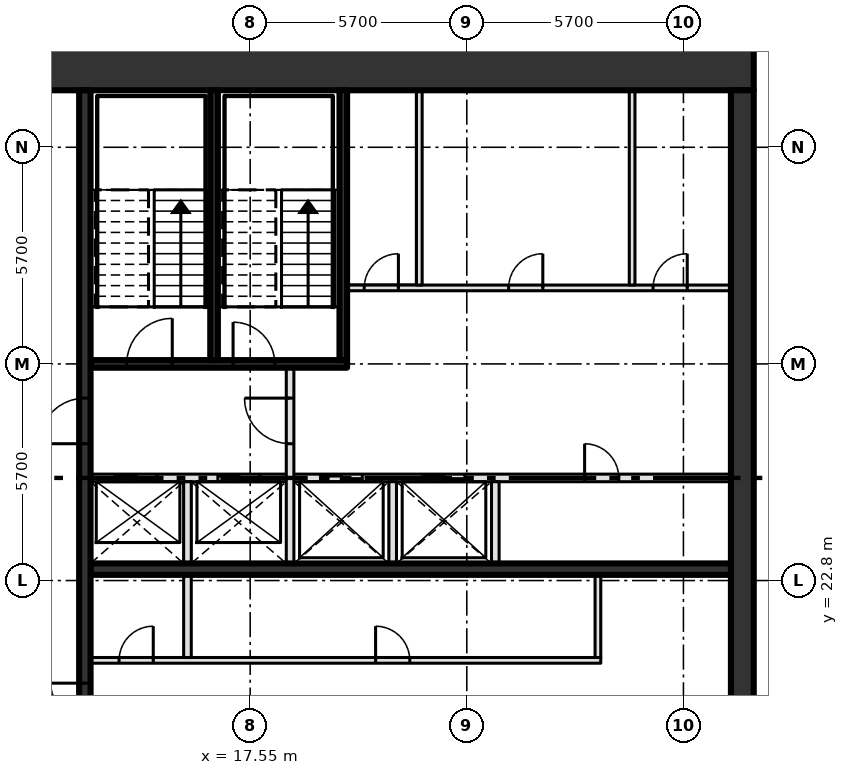
"""IFC4 building model, lengths in metres.
Left out: names, types, materials, properties, quantities, classifications, styles, units other than length and angle.
Written with IfcOpenShell. Run it as: python <this file> out.ifc"""

import sys

from ifc_helpers import new_model, si_unit, direction, frame, frame_2d, origin, place, context, subcontext, project, spatial, rectangle, extrude, element, fill, save


model = new_model("IFC4")
c1 = context("Model", 3, precision=1e-05, world=origin(), true_north=direction((0.0, 1.0)))
c2 = subcontext(c1, "Body", "Model", "MODEL_VIEW")
j1 = project(units=[si_unit("LENGTHUNIT", "METRE"), si_unit("PLANEANGLEUNIT", "RADIAN")], contexts=[c1])
p1 = place(None, origin())
s1 = spatial("IfcSite", under=j1, at=p1, CompositionType="ELEMENT")
p2 = place(p1, origin())
s2 = spatial("IfcBuilding", under=s1, at=p2, CompositionType="ELEMENT")
p3 = place(p2, frame((0.0, 0.0, 310.8)))
s3 = spatial("IfcBuildingStorey", under=s2, at=p3, CompositionType="ELEMENT", Elevation=310.8)
p4 = place(p3, frame((8.0, 36.3, -0.3), z_axis=(0.0, 0.0, 1.0), x_axis=(1.0, 0.0, 0.0)))
e1 = element("IfcWall", 1, at=p4, inside=s3, PredefinedType="SHEAR", context=c2, shape_type="SweptSolid", body=[
    extrude(rectangle(XDim=22.8, YDim=1.2, at=frame_2d((11.4, 0.0))), origin(), (0.0, 0.0, 1.0), 4.2),
])
p5 = place(p4, frame((2.3, 0.0, 0.3)))
e2 = element("IfcOpeningElement", 2, at=p5, cuts=e1, PredefinedType="OPENING", context=c2, shape_type="SweptSolid", body=[
    extrude(rectangle(XDim=1.8, YDim=2.1, at=frame_2d((0.9, 1.05))), frame((0.0, 0.61, 0.0), z_axis=(0.0, -1.0, 0.0), x_axis=(1.0, 0.0, 0.0)), (0.0, 0.0, 1.0), 1.22),
])
p6 = place(p3, frame((30.5, 14.7, -0.3), z_axis=(0.0, 0.0, 1.0), x_axis=(0.0, 1.0, 0.0)))
e3 = element("IfcWall", 3, at=p6, inside=s3, PredefinedType="SHEAR", context=c2, shape_type="SweptSolid", body=[
    extrude(rectangle(XDim=21.0, YDim=0.6, at=frame_2d((10.5, 0.0))), origin(), (0.0, 0.0, 1.0), 4.2),
])
p7 = place(p3, frame((13.35, 20.7, 0.0), z_axis=(0.0, 0.0, 1.0), x_axis=(1.0, 0.0, 0.0)))
e4 = element("IfcWall", 4, at=p7, inside=s3, PredefinedType="PARTITIONING", context=c2, shape_type="SweptSolid", body=[
    extrude(rectangle(XDim=13.425, YDim=0.15, at=frame_2d((6.712, 0.0))), origin(), (0.0, 0.0, 1.0), 3.9),
])
p8 = place(p7, frame((0.75, 0.0, 0.0)))
e5 = element("IfcOpeningElement", 5, at=p8, cuts=e4, PredefinedType="OPENING", context=c2, shape_type="SweptSolid", body=[
    extrude(rectangle(XDim=0.9, YDim=2.1, at=frame_2d((0.45, 1.05))), frame((0.0, 0.085, 0.0), z_axis=(0.0, -1.0, 0.0), x_axis=(1.0, 0.0, 0.0)), (0.0, 0.0, 1.0), 0.17),
])
p9 = place(p7, frame((7.5, 0.0, 0.0)))
e6 = element("IfcOpeningElement", 6, at=p9, cuts=e4, PredefinedType="OPENING", context=c2, shape_type="SweptSolid", body=[
    extrude(rectangle(XDim=0.9, YDim=2.1, at=frame_2d((0.45, 1.05))), frame((0.0, 0.085, 0.0), z_axis=(0.0, -1.0, 0.0), x_axis=(1.0, 0.0, 0.0)), (0.0, 0.0, 1.0), 0.17),
])
p10 = place(p3, frame((13.35, 23.1, 0.0), z_axis=(0.0, 0.0, 1.0), x_axis=(1.0, 0.0, 0.0)))
e7 = element("IfcWall", 7, at=p10, inside=s3, PredefinedType="SHEAR", context=c2, shape_type="SweptSolid", body=[
    extrude(rectangle(XDim=16.85, YDim=0.3, at=frame_2d((8.425, 0.0))), origin(), (0.0, 0.0, 1.0), 3.9),
])
p11 = place(p3, frame((13.35, 25.5, 0.0), z_axis=(0.0, 0.0, 1.0), x_axis=(1.0, 0.0, 0.0)))
e8 = element("IfcWall", 8, at=p11, inside=s3, PredefinedType="SOLIDWALL", context=c2, shape_type="SweptSolid", body=[
    extrude(rectangle(XDim=16.85, YDim=0.2, at=frame_2d((8.425, 0.0))), origin(), (0.0, 0.0, 1.0), 3.9),
])
p12 = place(p11, frame((0.65, 0.0, 0.0)))
e9 = element("IfcOpeningElement", 9, at=p12, cuts=e8, PredefinedType="OPENING", context=c2, shape_type="SweptSolid", body=[
    extrude(rectangle(XDim=1.1, YDim=2.1, at=frame_2d((0.55, 1.05))), frame((0.0, 0.11, 0.0), z_axis=(0.0, -1.0, 0.0), x_axis=(1.0, 0.0, 0.0)), (0.0, 0.0, 1.0), 0.22),
])
p13 = place(p11, frame((3.35, 0.0, 0.0)))
e10 = element("IfcOpeningElement", 10, at=p13, cuts=e8, PredefinedType="OPENING", context=c2, shape_type="SweptSolid", body=[
    extrude(rectangle(XDim=1.1, YDim=2.1, at=frame_2d((0.55, 1.05))), frame((0.0, 0.11, 0.0), z_axis=(0.0, -1.0, 0.0), x_axis=(1.0, 0.0, 0.0)), (0.0, 0.0, 1.0), 0.22),
])
p14 = place(p11, frame((6.05, 0.0, 0.0)))
e11 = element("IfcOpeningElement", 11, at=p14, cuts=e8, PredefinedType="OPENING", context=c2, shape_type="SweptSolid", body=[
    extrude(rectangle(XDim=1.1, YDim=2.1, at=frame_2d((0.55, 1.05))), frame((0.0, 0.11, 0.0), z_axis=(0.0, -1.0, 0.0), x_axis=(1.0, 0.0, 0.0)), (0.0, 0.0, 1.0), 0.22),
])
p15 = place(p11, frame((8.75, 0.0, 0.0)))
e12 = element("IfcOpeningElement", 12, at=p15, cuts=e8, PredefinedType="OPENING", context=c2, shape_type="SweptSolid", body=[
    extrude(rectangle(XDim=1.1, YDim=2.1, at=frame_2d((0.55, 1.05))), frame((0.0, 0.11, 0.0), z_axis=(0.0, -1.0, 0.0), x_axis=(1.0, 0.0, 0.0)), (0.0, 0.0, 1.0), 0.22),
])
p16 = place(p11, frame((13.0, 0.0, 0.0)))
e13 = element("IfcOpeningElement", 13, at=p16, cuts=e8, PredefinedType="OPENING", context=c2, shape_type="SweptSolid", body=[
    extrude(rectangle(XDim=0.9, YDim=2.1, at=frame_2d((0.45, 1.05))), frame((0.0, 0.11, 0.0), z_axis=(0.0, -1.0, 0.0), x_axis=(1.0, 0.0, 0.0)), (0.0, 0.0, 1.0), 0.22),
])
p17 = place(p3, frame((13.35, 28.5, 0.0), z_axis=(0.0, 0.0, 1.0), x_axis=(1.0, 0.0, 0.0)))
e14 = element("IfcWall", 14, at=p17, inside=s3, PredefinedType="SOLIDWALL", context=c2, shape_type="SweptSolid", body=[
    extrude(rectangle(XDim=6.75, YDim=0.2, at=frame_2d((3.375, 0.0))), origin(), (0.0, 0.0, 1.0), 3.9),
])
p18 = place(p17, frame((0.95, 0.0, 0.0)))
e15 = element("IfcOpeningElement", 15, at=p18, cuts=e14, PredefinedType="OPENING", context=c2, shape_type="SweptSolid", body=[
    extrude(rectangle(XDim=1.2, YDim=2.1, at=frame_2d((0.6, 1.05))), frame((0.0, 0.11, 0.0), z_axis=(0.0, -1.0, 0.0), x_axis=(1.0, 0.0, 0.0)), (0.0, 0.0, 1.0), 0.22),
])
p19 = place(p17, frame((3.75, 0.0, 0.0)))
e16 = element("IfcOpeningElement", 16, at=p19, cuts=e14, PredefinedType="OPENING", context=c2, shape_type="SweptSolid", body=[
    extrude(rectangle(XDim=1.1, YDim=2.1, at=frame_2d((0.55, 1.05))), frame((0.0, 0.11, 0.0), z_axis=(0.0, -1.0, 0.0), x_axis=(1.0, 0.0, 0.0)), (0.0, 0.0, 1.0), 0.22),
])
p20 = place(p3, frame((20.1, 30.5, 0.0), z_axis=(0.0, 0.0, 1.0), x_axis=(1.0, 0.0, 0.0)))
e17 = element("IfcWall", 17, at=p20, inside=s3, PredefinedType="PARTITIONING", context=c2, shape_type="SweptSolid", body=[
    extrude(rectangle(XDim=10.1, YDim=0.15, at=frame_2d((5.05, 0.0))), origin(), (0.0, 0.0, 1.0), 3.9),
])
p21 = place(p20, frame((0.45, 0.0, 0.0)))
e18 = element("IfcOpeningElement", 18, at=p21, cuts=e17, PredefinedType="OPENING", context=c2, shape_type="SweptSolid", body=[
    extrude(rectangle(XDim=0.9, YDim=2.1, at=frame_2d((0.45, 1.05))), frame((0.0, 0.085, 0.0), z_axis=(0.0, -1.0, 0.0), x_axis=(1.0, 0.0, 0.0)), (0.0, 0.0, 1.0), 0.17),
])
p22 = place(p20, frame((4.25, 0.0, 0.0)))
e19 = element("IfcOpeningElement", 19, at=p22, cuts=e17, PredefinedType="OPENING", context=c2, shape_type="SweptSolid", body=[
    extrude(rectangle(XDim=0.9, YDim=2.1, at=frame_2d((0.45, 1.05))), frame((0.0, 0.085, 0.0), z_axis=(0.0, -1.0, 0.0), x_axis=(1.0, 0.0, 0.0)), (0.0, 0.0, 1.0), 0.17),
])
p23 = place(p20, frame((8.05, 0.0, 0.0)))
e20 = element("IfcOpeningElement", 20, at=p23, cuts=e17, PredefinedType="OPENING", context=c2, shape_type="SweptSolid", body=[
    extrude(rectangle(XDim=0.9, YDim=2.1, at=frame_2d((0.45, 1.05))), frame((0.0, 0.085, 0.0), z_axis=(0.0, -1.0, 0.0), x_axis=(1.0, 0.0, 0.0)), (0.0, 0.0, 1.0), 0.17),
])
p24 = place(p3, frame((13.2, 14.7, 0.0), z_axis=(0.0, 0.0, 1.0), x_axis=(0.0, 1.0, 0.0)))
e21 = element("IfcWall", 21, at=p24, inside=s3, PredefinedType="SHEAR", context=c2, shape_type="SweptSolid", body=[
    extrude(rectangle(XDim=21.0, YDim=0.3, at=frame_2d((10.5, 0.0))), origin(), (0.0, 0.0, 1.0), 3.9),
])
p25 = place(p24, frame((3.6, 0.0, 0.0)))
e22 = element("IfcOpeningElement", 22, at=p25, cuts=e21, PredefinedType="OPENING", context=c2, shape_type="SweptSolid", body=[
    extrude(rectangle(XDim=1.8, YDim=2.1, at=frame_2d((0.9, 1.05))), frame((0.0, 0.16, 0.0), z_axis=(0.0, -1.0, 0.0), x_axis=(1.0, 0.0, 0.0)), (0.0, 0.0, 1.0), 0.32),
])
p26 = place(p24, frame((11.7, 0.0, 0.0)))
e23 = element("IfcOpeningElement", 23, at=p26, cuts=e21, PredefinedType="OPENING", context=c2, shape_type="SweptSolid", body=[
    extrude(rectangle(XDim=1.2, YDim=2.1, at=frame_2d((0.6, 1.05))), frame((0.0, 0.16, 0.0), z_axis=(0.0, -1.0, 0.0), x_axis=(1.0, 0.0, 0.0)), (0.0, 0.0, 1.0), 0.32),
])
p27 = place(p3, frame((15.9, 20.775, 0.0), z_axis=(0.0, 0.0, 1.0), x_axis=(0.0, 1.0, 0.0)))
e24 = element("IfcWall", 24, at=p27, inside=s3, PredefinedType="SOLIDWALL", context=c2, shape_type="SweptSolid", body=[
    extrude(rectangle(XDim=4.625, YDim=0.2, at=frame_2d((2.312, 0.0))), origin(), (0.0, 0.0, 1.0), 3.9),
])
p28 = place(p3, frame((16.6, 28.6, 0.0), z_axis=(0.0, 0.0, 1.0), x_axis=(0.0, 1.0, 0.0)))
e25 = element("IfcWall", 25, at=p28, inside=s3, PredefinedType="SOLIDWALL", context=c2, shape_type="SweptSolid", body=[
    extrude(rectangle(XDim=7.1, YDim=0.2, at=frame_2d((3.55, 0.0))), origin(), (0.0, 0.0, 1.0), 3.9),
])
p29 = place(p3, frame((18.6, 23.25, 0.0), z_axis=(0.0, 0.0, 1.0), x_axis=(0.0, 1.0, 0.0)))
e26 = element("IfcWall", 26, at=p29, inside=s3, PredefinedType="SOLIDWALL", context=c2, shape_type="SweptSolid", body=[
    extrude(rectangle(XDim=5.15, YDim=0.2, at=frame_2d((2.575, 0.0))), origin(), (0.0, 0.0, 1.0), 3.9),
])
p30 = place(p29, frame((3.15, 0.0, 0.0)))
e27 = element("IfcOpeningElement", 27, at=p30, cuts=e26, PredefinedType="OPENING", context=c2, shape_type="SweptSolid", body=[
    extrude(rectangle(XDim=1.2, YDim=2.1, at=frame_2d((0.6, 1.05))), frame((0.0, 0.11, 0.0), z_axis=(0.0, -1.0, 0.0), x_axis=(1.0, 0.0, 0.0)), (0.0, 0.0, 1.0), 0.22),
])
p31 = place(p3, frame((20.0, 28.6, 0.0), z_axis=(0.0, 0.0, 1.0), x_axis=(0.0, 1.0, 0.0)))
e28 = element("IfcWall", 28, at=p31, inside=s3, PredefinedType="SOLIDWALL", context=c2, shape_type="SweptSolid", body=[
    extrude(rectangle(XDim=7.1, YDim=0.2, at=frame_2d((3.55, 0.0))), origin(), (0.0, 0.0, 1.0), 3.9),
])
p32 = place(p3, frame((21.3, 23.25, 0.0), z_axis=(0.0, 0.0, 1.0), x_axis=(0.0, 1.0, 0.0)))
e29 = element("IfcWall", 29, at=p32, inside=s3, PredefinedType="SOLIDWALL", context=c2, shape_type="SweptSolid", body=[
    extrude(rectangle(XDim=2.15, YDim=0.2, at=frame_2d((1.075, 0.0))), origin(), (0.0, 0.0, 1.0), 3.9),
])
p33 = place(p3, frame((22.0, 30.575, 0.0), z_axis=(0.0, 0.0, 1.0), x_axis=(0.0, 1.0, 0.0)))
e30 = element("IfcWall", 30, at=p33, inside=s3, PredefinedType="PARTITIONING", context=c2, shape_type="SweptSolid", body=[
    extrude(rectangle(XDim=5.125, YDim=0.15, at=frame_2d((2.562, 0.0))), origin(), (0.0, 0.0, 1.0), 3.9),
])
p34 = place(p3, frame((24.0, 23.25, 0.0), z_axis=(0.0, 0.0, 1.0), x_axis=(0.0, 1.0, 0.0)))
e31 = element("IfcWall", 31, at=p34, inside=s3, PredefinedType="SOLIDWALL", context=c2, shape_type="SweptSolid", body=[
    extrude(rectangle(XDim=2.15, YDim=0.2, at=frame_2d((1.075, 0.0))), origin(), (0.0, 0.0, 1.0), 3.9),
])
p35 = place(p3, frame((26.7, 20.775, 0.0), z_axis=(0.0, 0.0, 1.0), x_axis=(0.0, 1.0, 0.0)))
e32 = element("IfcWall", 32, at=p35, inside=s3, PredefinedType="PARTITIONING", context=c2, shape_type="SweptSolid", body=[
    extrude(rectangle(XDim=2.175, YDim=0.15, at=frame_2d((1.087, 0.0))), origin(), (0.0, 0.0, 1.0), 3.9),
])
p36 = place(p3, frame((27.6, 30.575, 0.0), z_axis=(0.0, 0.0, 1.0), x_axis=(0.0, 1.0, 0.0)))
e33 = element("IfcWall", 33, at=p36, inside=s3, PredefinedType="PARTITIONING", context=c2, shape_type="SweptSolid", body=[
    extrude(rectangle(XDim=5.125, YDim=0.15, at=frame_2d((2.562, 0.0))), origin(), (0.0, 0.0, 1.0), 3.9),
])
p37 = place(p12, origin())
e34 = element("IfcDoor", 34, at=p37, inside=s3, OperationType="SLIDING_TO_LEFT", PredefinedType="DOOR", context=c2, shape_type="SweptSolid", body=[
    extrude(rectangle(XDim=1.1, YDim=2.1, at=frame_2d((0.55, 1.05))), frame((0.0, 0.025, 0.0), z_axis=(0.0, -1.0, 0.0), x_axis=(1.0, 0.0, 0.0)), (0.0, 0.0, 1.0), 0.05),
])
fill(e9, e34)
p38 = place(p13, origin())
e35 = element("IfcDoor", 35, at=p38, inside=s3, OperationType="SLIDING_TO_LEFT", PredefinedType="DOOR", context=c2, shape_type="SweptSolid", body=[
    extrude(rectangle(XDim=1.1, YDim=2.1, at=frame_2d((0.55, 1.05))), frame((0.0, 0.025, 0.0), z_axis=(0.0, -1.0, 0.0), x_axis=(1.0, 0.0, 0.0)), (0.0, 0.0, 1.0), 0.05),
])
fill(e10, e35)
p39 = place(p14, origin())
e36 = element("IfcDoor", 36, at=p39, inside=s3, OperationType="SLIDING_TO_LEFT", PredefinedType="DOOR", context=c2, shape_type="SweptSolid", body=[
    extrude(rectangle(XDim=1.1, YDim=2.1, at=frame_2d((0.55, 1.05))), frame((0.0, 0.025, 0.0), z_axis=(0.0, -1.0, 0.0), x_axis=(1.0, 0.0, 0.0)), (0.0, 0.0, 1.0), 0.05),
])
fill(e11, e36)
p40 = place(p15, origin())
e37 = element("IfcDoor", 37, at=p40, inside=s3, OperationType="SLIDING_TO_LEFT", PredefinedType="DOOR", context=c2, shape_type="SweptSolid", body=[
    extrude(rectangle(XDim=1.1, YDim=2.1, at=frame_2d((0.55, 1.05))), frame((0.0, 0.025, 0.0), z_axis=(0.0, -1.0, 0.0), x_axis=(1.0, 0.0, 0.0)), (0.0, 0.0, 1.0), 0.05),
])
fill(e12, e37)
p41 = place(p8, origin())
e38 = element("IfcDoor", 38, at=p41, inside=s3, OperationType="SINGLE_SWING_RIGHT", PredefinedType="DOOR", context=c2, shape_type="SweptSolid", body=[
    extrude(rectangle(XDim=0.9, YDim=2.1, at=frame_2d((0.45, 1.05))), frame((0.0, 0.025, 0.0), z_axis=(0.0, -1.0, 0.0), x_axis=(1.0, 0.0, 0.0)), (0.0, 0.0, 1.0), 0.05),
])
fill(e5, e38)
p42 = place(p9, origin())
e39 = element("IfcDoor", 39, at=p42, inside=s3, OperationType="SINGLE_SWING_LEFT", PredefinedType="DOOR", context=c2, shape_type="SweptSolid", body=[
    extrude(rectangle(XDim=0.9, YDim=2.1, at=frame_2d((0.45, 1.05))), frame((0.0, 0.025, 0.0), z_axis=(0.0, -1.0, 0.0), x_axis=(1.0, 0.0, 0.0)), (0.0, 0.0, 1.0), 0.05),
])
fill(e6, e39)
p43 = place(p16, origin())
e40 = element("IfcDoor", 40, at=p43, inside=s3, OperationType="SINGLE_SWING_LEFT", PredefinedType="DOOR", context=c2, shape_type="SweptSolid", body=[
    extrude(rectangle(XDim=0.9, YDim=2.1, at=frame_2d((0.45, 1.05))), frame((0.0, 0.025, 0.0), z_axis=(0.0, -1.0, 0.0), x_axis=(1.0, 0.0, 0.0)), (0.0, 0.0, 1.0), 0.05),
])
fill(e13, e40)
p44 = place(p21, origin())
e41 = element("IfcDoor", 41, at=p44, inside=s3, OperationType="SINGLE_SWING_RIGHT", PredefinedType="DOOR", context=c2, shape_type="SweptSolid", body=[
    extrude(rectangle(XDim=0.9, YDim=2.1, at=frame_2d((0.45, 1.05))), frame((0.0, 0.025, 0.0), z_axis=(0.0, -1.0, 0.0), x_axis=(1.0, 0.0, 0.0)), (0.0, 0.0, 1.0), 0.05),
])
fill(e18, e41)
p45 = place(p22, origin())
e42 = element("IfcDoor", 42, at=p45, inside=s3, OperationType="SINGLE_SWING_RIGHT", PredefinedType="DOOR", context=c2, shape_type="SweptSolid", body=[
    extrude(rectangle(XDim=0.9, YDim=2.1, at=frame_2d((0.45, 1.05))), frame((0.0, 0.025, 0.0), z_axis=(0.0, -1.0, 0.0), x_axis=(1.0, 0.0, 0.0)), (0.0, 0.0, 1.0), 0.05),
])
fill(e19, e42)
p46 = place(p23, origin())
e43 = element("IfcDoor", 43, at=p46, inside=s3, OperationType="SINGLE_SWING_RIGHT", PredefinedType="DOOR", context=c2, shape_type="SweptSolid", body=[
    extrude(rectangle(XDim=0.9, YDim=2.1, at=frame_2d((0.45, 1.05))), frame((0.0, 0.025, 0.0), z_axis=(0.0, -1.0, 0.0), x_axis=(1.0, 0.0, 0.0)), (0.0, 0.0, 1.0), 0.05),
])
fill(e20, e43)
p47 = place(p18, origin())
e44 = element("IfcDoor", 44, at=p47, inside=s3, OperationType="SINGLE_SWING_RIGHT", PredefinedType="DOOR", context=c2, shape_type="SweptSolid", body=[
    extrude(rectangle(XDim=1.2, YDim=2.1, at=frame_2d((0.6, 1.05))), frame((0.0, 0.025, 0.0), z_axis=(0.0, -1.0, 0.0), x_axis=(1.0, 0.0, 0.0)), (0.0, 0.0, 1.0), 0.05),
])
fill(e15, e44)
p48 = place(p19, origin())
e45 = element("IfcDoor", 45, at=p48, inside=s3, OperationType="SINGLE_SWING_LEFT", PredefinedType="DOOR", context=c2, shape_type="SweptSolid", body=[
    extrude(rectangle(XDim=1.1, YDim=2.1, at=frame_2d((0.55, 1.05))), frame((0.0, 0.025, 0.0), z_axis=(0.0, -1.0, 0.0), x_axis=(1.0, 0.0, 0.0)), (0.0, 0.0, 1.0), 0.05),
])
fill(e16, e45)
p49 = place(p25, origin())
e46 = element("IfcDoor", 46, at=p49, inside=s3, OperationType="DOUBLE_DOOR_SINGLE_SWING", PredefinedType="DOOR", context=c2, shape_type="SweptSolid", body=[
    extrude(rectangle(XDim=1.8, YDim=2.1, at=frame_2d((0.9, 1.05))), frame((0.0, 0.025, 0.0), z_axis=(0.0, -1.0, 0.0), x_axis=(1.0, 0.0, 0.0)), (0.0, 0.0, 1.0), 0.05),
])
fill(e22, e46)
p50 = place(p26, origin())
e47 = element("IfcDoor", 47, at=p50, inside=s3, OperationType="SINGLE_SWING_LEFT", PredefinedType="DOOR", context=c2, shape_type="SweptSolid", body=[
    extrude(rectangle(XDim=1.2, YDim=2.1, at=frame_2d((0.6, 1.05))), frame((0.0, 0.025, 0.0), z_axis=(0.0, -1.0, 0.0), x_axis=(1.0, 0.0, 0.0)), (0.0, 0.0, 1.0), 0.05),
])
fill(e23, e47)
p51 = place(p30, origin())
e48 = element("IfcDoor", 48, at=p51, inside=s3, OperationType="SINGLE_SWING_RIGHT", PredefinedType="DOOR", context=c2, shape_type="SweptSolid", body=[
    extrude(rectangle(XDim=1.2, YDim=2.1, at=frame_2d((0.6, 1.05))), frame((0.0, 0.025, 0.0), z_axis=(0.0, -1.0, 0.0), x_axis=(1.0, 0.0, 0.0)), (0.0, 0.0, 1.0), 0.05),
])
fill(e27, e48)
save(model, sys.argv[1])
